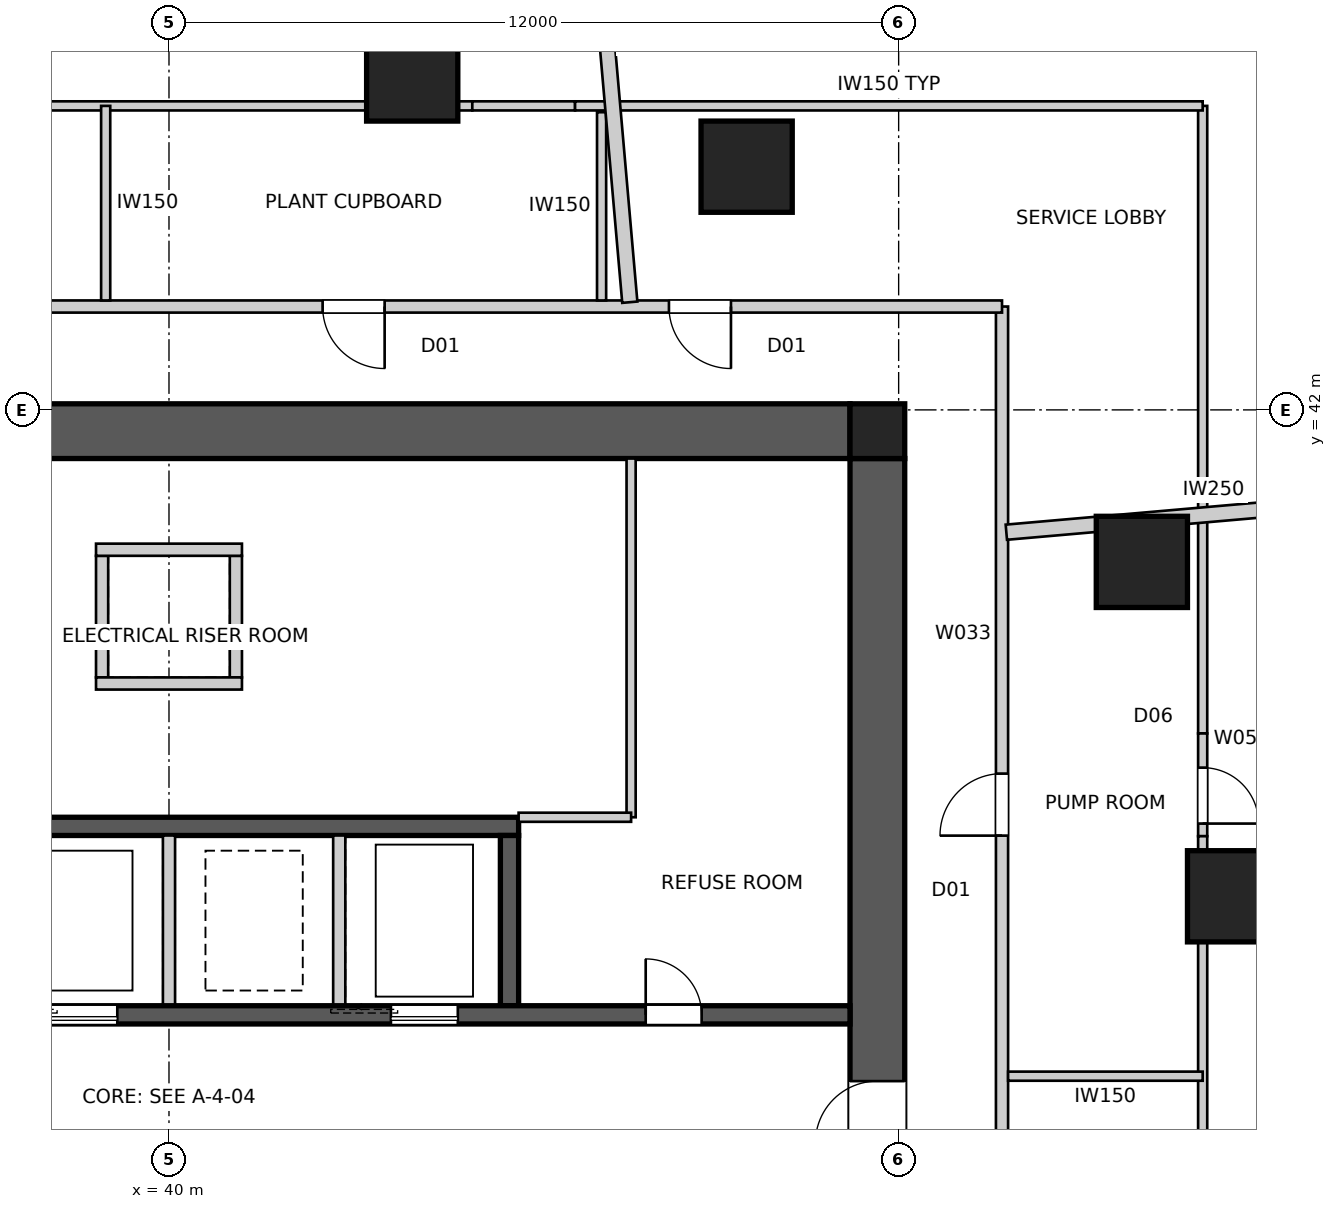
"""IFC4 building model, lengths in metres.
Left out: names, types, materials, properties, quantities, classifications, styles, units other than length and angle.
Written with IfcOpenShell. Run it as: python <this file> out.ifc"""

import sys

from ifc_helpers import new_model, si_unit, direction, frame, frame_2d, origin, origin_2d, place, context, subcontext, project, spatial, polyline, rectangle, outline, extrude, element, fill, save


model = new_model("IFC4")
c1 = context("Model", 3, precision=1e-05, world=origin(), true_north=direction((0.0, 1.0)))
c2 = subcontext(c1, "Body", "Model", "MODEL_VIEW")
j1 = project(units=[si_unit("LENGTHUNIT", "METRE"), si_unit("PLANEANGLEUNIT", "RADIAN")], contexts=[c1])
p1 = place(None, origin())
s1 = spatial("IfcSite", under=j1, at=p1, CompositionType="ELEMENT")
p2 = place(p1, origin())
s2 = spatial("IfcBuilding", under=s1, at=p2, CompositionType="ELEMENT")
p3 = place(p2, frame((0.0, 0.0, 42.2)))
s3 = spatial("IfcBuildingStorey", under=s2, at=p3, CompositionType="ELEMENT", Elevation=42.2)
p4 = place(p3, frame((28.8, 41.65, 0.0), z_axis=(0.0, 0.0, 1.0), x_axis=(1.0, 0.0, 0.0)))
e1 = element("IfcWall", 1, at=p4, inside=s3, PredefinedType="SHEAR", context=c2, shape_type="SweptSolid", body=[
    extrude(outline(polyline([(0.0, -0.45), (22.4, -0.45), (22.4, -0.025), (22.85, -0.025), (22.85, 0.025), (22.4, 0.025), (22.4, 0.45), (0.0, 0.45), (0.0, 0.025), (-0.45, 0.025), (-0.45, -0.025), (0.0, -0.025), (0.0, -0.45)])), origin(), (0.0, 0.0, 1.0), 5.0),
])
p5 = place(p3, frame((51.65, 18.8, 0.0), z_axis=(0.0, 0.0, 1.0), x_axis=(0.0, 1.0, 0.0)))
e2 = element("IfcWall", 2, at=p5, inside=s3, PredefinedType="SHEAR", context=c2, shape_type="SweptSolid", body=[
    extrude(outline(polyline([(0.0, -0.45), (22.4, -0.45), (22.4, -0.025), (22.85, -0.025), (22.85, 0.025), (22.4, 0.025), (22.4, 0.45), (0.0, 0.45), (0.0, 0.025), (-0.45, 0.025), (-0.45, -0.025), (0.0, -0.025), (0.0, -0.45)])), origin(), (0.0, 0.0, 1.0), 5.0),
])
p6 = place(p5, frame((11.14, 0.0, 0.0)))
e3 = element("IfcOpeningElement", 3, at=p6, cuts=e2, PredefinedType="OPENING", context=c2, shape_type="SweptSolid", body=[
    extrude(rectangle(XDim=1.02, YDim=2.4, at=frame_2d((0.51, 1.2))), frame((0.0, 0.46, 0.0), z_axis=(0.0, -1.0, 0.0), x_axis=(1.0, 0.0, 0.0)), (0.0, 0.0, 1.0), 0.92),
])
p7 = place(p3, frame((28.8, 32.05, 0.0), z_axis=(0.0, 0.0, 1.0), x_axis=(1.0, 0.0, 0.0)))
e4 = element("IfcWall", 4, at=p7, inside=s3, PredefinedType="SHEAR", context=c2, shape_type="SweptSolid", body=[
    extrude(rectangle(XDim=22.4, YDim=0.3, at=frame_2d((11.2, 0.0))), origin(), (0.0, 0.0, 1.0), 5.0),
])
p8 = place(p7, frame((19.04, 0.0, 0.0)))
e5 = element("IfcOpeningElement", 5, at=p8, cuts=e4, PredefinedType="OPENING", context=c2, shape_type="SweptSolid", body=[
    extrude(rectangle(XDim=0.92, YDim=2.1, at=frame_2d((0.46, 1.05))), frame((0.0, 0.16, 0.0), z_axis=(0.0, -1.0, 0.0), x_axis=(1.0, 0.0, 0.0)), (0.0, 0.0, 1.0), 0.32),
])
p9 = place(p7, frame((1.265, 0.0, 0.0)))
e6 = element("IfcOpeningElement", 6, at=p9, cuts=e4, PredefinedType="OPENING", context=c2, shape_type="SweptSolid", body=[
    extrude(rectangle(XDim=1.02, YDim=2.1, at=frame_2d((0.51, 1.05))), frame((0.0, 0.16, 0.0), z_axis=(0.0, -1.0, 0.0), x_axis=(1.0, 0.0, 0.0)), (0.0, 0.0, 1.0), 0.32),
])
p10 = place(p7, frame((4.015, 0.0, 0.0)))
e7 = element("IfcOpeningElement", 7, at=p10, cuts=e4, PredefinedType="OPENING", context=c2, shape_type="SweptSolid", body=[
    extrude(rectangle(XDim=0.92, YDim=2.1, at=frame_2d((0.46, 1.05))), frame((0.0, 0.16, 0.0), z_axis=(0.0, -1.0, 0.0), x_axis=(1.0, 0.0, 0.0)), (0.0, 0.0, 1.0), 0.32),
])
p11 = place(p7, frame((6.45, 0.0, 0.0)))
e8 = element("IfcOpeningElement", 8, at=p11, cuts=e4, PredefinedType="OPENING", context=c2, shape_type="SweptSolid", body=[
    extrude(rectangle(XDim=1.1, YDim=2.1, at=frame_2d((0.55, 1.05))), frame((0.0, 0.16, 0.0), z_axis=(0.0, -1.0, 0.0), x_axis=(1.0, 0.0, 0.0)), (0.0, 0.0, 1.0), 0.32),
])
p12 = place(p7, frame((9.25, 0.0, 0.0)))
e9 = element("IfcOpeningElement", 9, at=p12, cuts=e4, PredefinedType="OPENING", context=c2, shape_type="SweptSolid", body=[
    extrude(rectangle(XDim=1.1, YDim=2.1, at=frame_2d((0.55, 1.05))), frame((0.0, 0.16, 0.0), z_axis=(0.0, -1.0, 0.0), x_axis=(1.0, 0.0, 0.0)), (0.0, 0.0, 1.0), 0.32),
])
p13 = place(p7, frame((14.85, 0.0, 0.0)))
e10 = element("IfcOpeningElement", 10, at=p13, cuts=e4, PredefinedType="OPENING", context=c2, shape_type="SweptSolid", body=[
    extrude(rectangle(XDim=1.1, YDim=2.1, at=frame_2d((0.55, 1.05))), frame((0.0, 0.16, 0.0), z_axis=(0.0, -1.0, 0.0), x_axis=(1.0, 0.0, 0.0)), (0.0, 0.0, 1.0), 0.32),
])
p14 = place(p3, frame((34.25, 35.15, 0.0), z_axis=(0.0, 0.0, 1.0), x_axis=(1.0, 0.0, 0.0)))
e11 = element("IfcWall", 11, at=p14, inside=s3, PredefinedType="SHEAR", context=c2, shape_type="SweptSolid", body=[
    extrude(rectangle(XDim=11.5, YDim=0.3, at=frame_2d((5.75, 0.0))), origin(), (0.0, 0.0, 1.0), 5.0),
])
for number, where, z_axis, x_axis in (
    (12, (40.0, 32.2, 0.0), (0.0, 0.0, 1.0), (0.0, 1.0, 0.0)),
    (13, (42.8, 32.2, 0.0), (0.0, 0.0, 1.0), (0.0, 1.0, 0.0)),
):
    element("IfcWall", number, at=place(p3, frame(where, z_axis=z_axis, x_axis=x_axis)), inside=s3, PredefinedType="SOLIDWALL", context=c2, shape_type="SweptSolid", body=[
        extrude(rectangle(XDim=2.8, YDim=0.2, at=frame_2d((1.4, 0.0))), origin(), (0.0, 0.0, 1.0), 5.0),
    ])
p15 = place(p3, frame((45.6, 32.2, 0.0), z_axis=(0.0, 0.0, 1.0), x_axis=(0.0, 1.0, 0.0)))
e14 = element("IfcWall", 14, at=p15, inside=s3, PredefinedType="SHEAR", context=c2, shape_type="SweptSolid", body=[
    extrude(rectangle(XDim=2.8, YDim=0.3, at=frame_2d((1.4, 0.0))), origin(), (0.0, 0.0, 1.0), 5.0),
])
for number, where, z_axis, x_axis in (
    (15, (38.9, 37.6, 0.0), (0.0, 0.0, 1.0), (0.0, 1.0, 0.0)),
    (16, (41.1, 37.6, 0.0), (0.0, 0.0, 1.0), (0.0, 1.0, 0.0)),
):
    element("IfcWall", number, at=place(p3, frame(where, z_axis=z_axis, x_axis=x_axis)), inside=s3, PredefinedType="SOLIDWALL", context=c2, shape_type="SweptSolid", body=[
        extrude(rectangle(XDim=2.0, YDim=0.2, at=frame_2d((1.0, 0.0))), origin(), (0.0, 0.0, 1.0), 5.0),
    ])
for number, where, z_axis, x_axis in (
    (17, (38.8, 37.5, 0.0), (0.0, 0.0, 1.0), (1.0, 0.0, 0.0)),
    (18, (38.8, 39.7, 0.0), (0.0, 0.0, 1.0), (1.0, 0.0, 0.0)),
):
    element("IfcWall", number, at=place(p3, frame(where, z_axis=z_axis, x_axis=x_axis)), inside=s3, PredefinedType="SOLIDWALL", context=c2, shape_type="SweptSolid", body=[
        extrude(rectangle(XDim=2.4, YDim=0.2, at=frame_2d((1.2, 0.0))), origin(), (0.0, 0.0, 1.0), 5.0),
    ])
p16 = place(p3, frame((51.65, 41.65, 0.0), z_axis=(0.0, 0.0, 1.0), x_axis=(1.0, 0.0, 0.0)))
e19 = element("IfcColumn", 19, at=p16, inside=s3, PredefinedType="COLUMN", context=c2, shape_type="SweptSolid", body=[
    extrude(rectangle(XDim=0.9, YDim=0.9, at=origin_2d()), origin(), (0.0, 0.0, 1.0), 5.0),
])
for number, where, z_axis, x_axis in (
    (20, (57.5, 34.0, 0.0), (0.0, 0.0, 1.0), (1.0, 0.0, 0.0)),
    (21, (56.0, 39.5, 0.0), (0.0, 0.0, 1.0), (1.0, 0.0, 0.0)),
    (22, (49.5, 46.0, 0.0), (0.0, 0.0, 1.0), (1.0, 0.0, 0.0)),
    (23, (44.0, 47.5, 0.0), (0.0, 0.0, 1.0), (1.0, 0.0, 0.0)),
):
    element("IfcColumn", number, at=place(p3, frame(where, z_axis=z_axis, x_axis=x_axis)), inside=s3, PredefinedType="COLUMN", context=c2, shape_type="SweptSolid", body=[
        extrude(rectangle(XDim=1.5, YDim=1.5, at=origin_2d()), origin(), (0.0, 0.0, 1.0), 5.0),
    ])
p17 = place(p3, frame((53.7, 16.3, 0.0), z_axis=(0.0, 0.0, 1.0), x_axis=(0.0, 1.0, 0.0)))
e24 = element("IfcWall", 24, at=p17, inside=s3, PredefinedType="PARTITIONING", context=c2, shape_type="SweptSolid", body=[
    extrude(rectangle(XDim=27.4, YDim=0.2, at=frame_2d((13.7, 0.0))), origin(), (0.0, 0.0, 1.0), 4.85),
])
p18 = place(p17, frame((18.698, 0.0, 0.0)))
e25 = element("IfcOpeningElement", 25, at=p18, cuts=e24, PredefinedType="OPENING", context=c2, shape_type="SweptSolid", body=[
    extrude(rectangle(XDim=1.02, YDim=2.34, at=frame_2d((0.51, 1.17))), frame((0.0, 0.11, 0.0), z_axis=(0.0, -1.0, 0.0), x_axis=(1.0, 0.0, 0.0)), (0.0, 0.0, 1.0), 0.22),
])
p19 = place(p17, frame((10.153, 0.0, 0.0)))
e26 = element("IfcOpeningElement", 26, at=p19, cuts=e24, PredefinedType="OPENING", context=c2, shape_type="SweptSolid", body=[
    extrude(rectangle(XDim=1.02, YDim=2.34, at=frame_2d((0.51, 1.17))), frame((0.0, 0.11, 0.0), z_axis=(0.0, -1.0, 0.0), x_axis=(1.0, 0.0, 0.0)), (0.0, 0.0, 1.0), 0.22),
])
p20 = place(p17, frame((4.458, 0.0, 0.0)))
e27 = element("IfcOpeningElement", 27, at=p20, cuts=e24, PredefinedType="OPENING", context=c2, shape_type="SweptSolid", body=[
    extrude(rectangle(XDim=1.02, YDim=2.34, at=frame_2d((0.51, 1.17))), frame((0.0, 0.11, 0.0), z_axis=(0.0, -1.0, 0.0), x_axis=(1.0, 0.0, 0.0)), (0.0, 0.0, 1.0), 0.22),
])
p21 = place(p3, frame((53.7, 43.7, 0.0), z_axis=(0.0, 0.0, 1.0), x_axis=(-1.0, 0.0, 0.0)))
e28 = element("IfcWall", 28, at=p21, inside=s3, PredefinedType="PARTITIONING", context=c2, shape_type="SweptSolid", body=[
    extrude(rectangle(XDim=27.4, YDim=0.2, at=frame_2d((13.7, 0.0))), origin(), (0.0, 0.0, 1.0), 4.85),
])
p22 = place(p21, frame((18.698, 0.0, 0.0)))
e29 = element("IfcOpeningElement", 29, at=p22, cuts=e28, PredefinedType="OPENING", context=c2, shape_type="SweptSolid", body=[
    extrude(rectangle(XDim=1.02, YDim=2.34, at=frame_2d((0.51, 1.17))), frame((0.0, 0.11, 0.0), z_axis=(0.0, -1.0, 0.0), x_axis=(1.0, 0.0, 0.0)), (0.0, 0.0, 1.0), 0.22),
])
p23 = place(p21, frame((10.153, 0.0, 0.0)))
e30 = element("IfcOpeningElement", 30, at=p23, cuts=e28, PredefinedType="OPENING", context=c2, shape_type="SweptSolid", body=[
    extrude(rectangle(XDim=1.02, YDim=2.34, at=frame_2d((0.51, 1.17))), frame((0.0, 0.11, 0.0), z_axis=(0.0, -1.0, 0.0), x_axis=(1.0, 0.0, 0.0)), (0.0, 0.0, 1.0), 0.22),
])
p24 = place(p21, frame((4.458, 0.0, 0.0)))
e31 = element("IfcOpeningElement", 31, at=p24, cuts=e28, PredefinedType="OPENING", context=c2, shape_type="SweptSolid", body=[
    extrude(rectangle(XDim=1.02, YDim=2.34, at=frame_2d((0.51, 1.17))), frame((0.0, 0.11, 0.0), z_axis=(0.0, -1.0, 0.0), x_axis=(1.0, 0.0, 0.0)), (0.0, 0.0, 1.0), 0.22),
])
p25 = place(p3, frame((60.656, 40.591, 0.0), z_axis=(0.0, 0.0, 1.0), x_axis=(-0.996194982798, -0.087152488477, 0.0)))
e32 = element("IfcWall", 32, at=p25, inside=s3, PredefinedType="PARTITIONING", context=c2, shape_type="SweptSolid", body=[
    extrude(rectangle(XDim=6.911, YDim=0.25, at=frame_2d((3.456, 0.0))), origin(), (0.0, 0.0, 1.0), 4.85),
])
p26 = place(p3, frame((46.843, 52.181, 0.0), z_axis=(0.0, 0.0, 1.0), x_axis=(0.087163721544, -0.996194000005, 0.0)))
e33 = element("IfcWall", 33, at=p26, inside=s3, PredefinedType="PARTITIONING", context=c2, shape_type="SweptSolid", body=[
    extrude(rectangle(XDim=8.442, YDim=0.25, at=frame_2d((4.221, 0.0))), origin(), (0.0, 0.0, 1.0), 4.85),
])
p27 = place(p3, frame((47.6, 41.2, 0.0), z_axis=(0.0, 0.0, 1.0), x_axis=(0.0, -1.0, 0.0)))
e34 = element("IfcWall", 34, at=p27, inside=s3, PredefinedType="SOLIDWALL", context=c2, shape_type="SweptSolid", body=[
    extrude(rectangle(XDim=5.9, YDim=0.15, at=frame_2d((2.95, 0.0))), origin(), (0.0, 0.0, 1.0), 4.85),
])
p28 = place(p3, frame((47.6, 35.3, 0.0), z_axis=(0.0, 0.0, 1.0), x_axis=(-1.0, 0.0, 0.0)))
e35 = element("IfcWall", 35, at=p28, inside=s3, PredefinedType="SOLIDWALL", context=c2, shape_type="SweptSolid", body=[
    extrude(rectangle(XDim=1.85, YDim=0.15, at=frame_2d((0.925, 0.0))), origin(), (0.0, 0.0, 1.0), 4.85),
])
p29 = place(p3, frame((57.0, 47.0, 0.0), z_axis=(0.0, 0.0, 1.0), x_axis=(0.0, -1.0, 0.0)))
e36 = element("IfcWall", 36, at=p29, inside=s3, PredefinedType="SOLIDWALL", context=c2, shape_type="SweptSolid", body=[
    extrude(rectangle(XDim=10.322, YDim=0.15, at=frame_2d((5.161, 0.0))), origin(), (0.0, 0.0, 1.0), 4.85),
])
p30 = place(p3, frame((57.0, 36.678, 0.0), z_axis=(0.0, 0.0, 1.0), x_axis=(0.0, -1.0, 0.0)))
e37 = element("IfcWall", 37, at=p30, inside=s3, PredefinedType="SOLIDWALL", context=c2, shape_type="SweptSolid", body=[
    extrude(rectangle(XDim=1.69, YDim=0.15, at=frame_2d((0.845, 0.0))), origin(), (0.0, 0.0, 1.0), 3.85),
])
p31 = place(p30, frame((0.562, 0.0, 0.0)))
e38 = element("IfcOpeningElement", 38, at=p31, cuts=e37, PredefinedType="OPENING", context=c2, shape_type="SweptSolid", body=[
    extrude(rectangle(XDim=0.92, YDim=2.1, at=frame_2d((0.46, 1.05))), frame((0.0, 0.085, 0.0), z_axis=(0.0, -1.0, 0.0), x_axis=(1.0, 0.0, 0.0)), (0.0, 0.0, 1.0), 0.17),
])
p32 = place(p3, frame((57.0, 34.988, 0.0), z_axis=(0.0, 0.0, 1.0), x_axis=(0.0, -1.0, 0.0)))
e39 = element("IfcWall", 39, at=p32, inside=s3, PredefinedType="SOLIDWALL", context=c2, shape_type="SweptSolid", body=[
    extrude(rectangle(XDim=9.977, YDim=0.15, at=frame_2d((4.988, 0.0))), origin(), (0.0, 0.0, 1.0), 4.85),
])
p33 = place(p3, frame((57.0, 31.041, 0.0), z_axis=(0.0, 0.0, 1.0), x_axis=(-1.0, 0.0, 0.0)))
e40 = element("IfcWall", 40, at=p33, inside=s3, PredefinedType="SOLIDWALL", context=c2, shape_type="SweptSolid", body=[
    extrude(rectangle(XDim=3.2, YDim=0.15, at=frame_2d((1.6, 0.0))), origin(), (0.0, 0.0, 1.0), 4.85),
])
p34 = place(p3, frame((47.115, 43.8, 0.0), z_axis=(0.0, 0.0, 1.0), x_axis=(0.0, 1.0, 0.0)))
e41 = element("IfcWall", 41, at=p34, inside=s3, PredefinedType="SOLIDWALL", context=c2, shape_type="SweptSolid", body=[
    extrude(rectangle(XDim=3.096, YDim=0.15, at=frame_2d((1.548, 0.0))), origin(), (0.0, 0.0, 1.0), 4.85),
])
p35 = place(p3, frame((35.012, 47.0, 0.0), z_axis=(0.0, 0.0, 1.0), x_axis=(1.0, 0.0, 0.0)))
e42 = element("IfcWall", 42, at=p35, inside=s3, PredefinedType="SOLIDWALL", context=c2, shape_type="SweptSolid", body=[
    extrude(rectangle(XDim=9.977, YDim=0.15, at=frame_2d((4.988, 0.0))), origin(), (0.0, 0.0, 1.0), 4.85),
])
p36 = place(p3, frame((44.988, 47.0, 0.0), z_axis=(0.0, 0.0, 1.0), x_axis=(1.0, 0.0, 0.0)))
e43 = element("IfcWall", 43, at=p36, inside=s3, PredefinedType="SOLIDWALL", context=c2, shape_type="SweptSolid", body=[
    extrude(rectangle(XDim=1.69, YDim=0.15, at=frame_2d((0.845, 0.0))), origin(), (0.0, 0.0, 1.0), 3.85),
])
p37 = place(p3, frame((46.678, 47.0, 0.0), z_axis=(0.0, 0.0, 1.0), x_axis=(1.0, 0.0, 0.0)))
e44 = element("IfcWall", 44, at=p37, inside=s3, PredefinedType="SOLIDWALL", context=c2, shape_type="SweptSolid", body=[
    extrude(rectangle(XDim=10.322, YDim=0.15, at=frame_2d((5.161, 0.0))), origin(), (0.0, 0.0, 1.0), 4.85),
])
p38 = place(p3, frame((38.959, 47.0, 0.0), z_axis=(0.0, 0.0, 1.0), x_axis=(0.0, -1.0, 0.0)))
e45 = element("IfcWall", 45, at=p38, inside=s3, PredefinedType="SOLIDWALL", context=c2, shape_type="SweptSolid", body=[
    extrude(rectangle(XDim=3.2, YDim=0.15, at=frame_2d((1.6, 0.0))), origin(), (0.0, 0.0, 1.0), 4.85),
])
p39 = place(p8, origin())
e46 = element("IfcDoor", 46, at=p39, inside=s3, OperationType="SINGLE_SWING_LEFT", PredefinedType="DOOR", context=c2, shape_type="SweptSolid", body=[
    extrude(rectangle(XDim=0.92, YDim=2.1, at=frame_2d((0.46, 1.05))), frame((0.0, 0.025, 0.0), z_axis=(0.0, -1.0, 0.0), x_axis=(1.0, 0.0, 0.0)), (0.0, 0.0, 1.0), 0.05),
])
fill(e5, e46)
p40 = place(p18, origin())
e47 = element("IfcDoor", 47, at=p40, inside=s3, OperationType="SINGLE_SWING_LEFT", PredefinedType="DOOR", context=c2, shape_type="SweptSolid", body=[
    extrude(rectangle(XDim=1.02, YDim=2.34, at=frame_2d((0.51, 1.17))), frame((0.0, 0.025, 0.0), z_axis=(0.0, -1.0, 0.0), x_axis=(1.0, 0.0, 0.0)), (0.0, 0.0, 1.0), 0.05),
])
fill(e25, e47)
p41 = place(p23, origin())
e48 = element("IfcDoor", 48, at=p41, inside=s3, OperationType="SINGLE_SWING_LEFT", PredefinedType="DOOR", context=c2, shape_type="SweptSolid", body=[
    extrude(rectangle(XDim=1.02, YDim=2.34, at=frame_2d((0.51, 1.17))), frame((0.0, 0.025, 0.0), z_axis=(0.0, -1.0, 0.0), x_axis=(1.0, 0.0, 0.0)), (0.0, 0.0, 1.0), 0.05),
])
fill(e30, e48)
p42 = place(p24, origin())
e49 = element("IfcDoor", 49, at=p42, inside=s3, OperationType="SINGLE_SWING_LEFT", PredefinedType="DOOR", context=c2, shape_type="SweptSolid", body=[
    extrude(rectangle(XDim=1.02, YDim=2.34, at=frame_2d((0.51, 1.17))), frame((0.0, 0.025, 0.0), z_axis=(0.0, -1.0, 0.0), x_axis=(1.0, 0.0, 0.0)), (0.0, 0.0, 1.0), 0.05),
])
fill(e31, e49)
p43 = place(p31, origin())
e50 = element("IfcDoor", 50, at=p43, inside=s3, OperationType="SINGLE_SWING_RIGHT", PredefinedType="DOOR", context=c2, shape_type="SweptSolid", body=[
    extrude(rectangle(XDim=0.92, YDim=2.1, at=frame_2d((0.46, 1.05))), frame((0.0, 0.025, 0.0), z_axis=(0.0, -1.0, 0.0), x_axis=(1.0, 0.0, 0.0)), (0.0, 0.0, 1.0), 0.05),
])
fill(e38, e50)
p44 = place(p6, origin())
e51 = element("IfcDoor", 51, at=p44, inside=s3, OperationType="SINGLE_SWING_LEFT", PredefinedType="DOOR", context=c2, shape_type="SweptSolid", body=[
    extrude(rectangle(XDim=1.02, YDim=2.4, at=frame_2d((0.51, 1.2))), frame((0.0, 0.025, 0.0), z_axis=(0.0, -1.0, 0.0), x_axis=(1.0, 0.0, 0.0)), (0.0, 0.0, 1.0), 0.05),
])
fill(e3, e51)
p45 = place(p12, origin())
e52 = element("IfcDoor", 52, at=p45, inside=s3, OperationType="SLIDING_TO_LEFT", PredefinedType="DOOR", context=c2, shape_type="SweptSolid", body=[
    extrude(rectangle(XDim=1.1, YDim=2.1, at=frame_2d((0.55, 1.05))), frame((0.0, 0.025, 0.0), z_axis=(0.0, -1.0, 0.0), x_axis=(1.0, 0.0, 0.0)), (0.0, 0.0, 1.0), 0.05),
])
fill(e9, e52)
p46 = place(p13, origin())
e53 = element("IfcDoor", 53, at=p46, inside=s3, OperationType="SLIDING_TO_LEFT", PredefinedType="DOOR", context=c2, shape_type="SweptSolid", body=[
    extrude(rectangle(XDim=1.1, YDim=2.1, at=frame_2d((0.55, 1.05))), frame((0.0, 0.025, 0.0), z_axis=(0.0, -1.0, 0.0), x_axis=(1.0, 0.0, 0.0)), (0.0, 0.0, 1.0), 0.05),
])
fill(e10, e53)
save(model, sys.argv[1])
